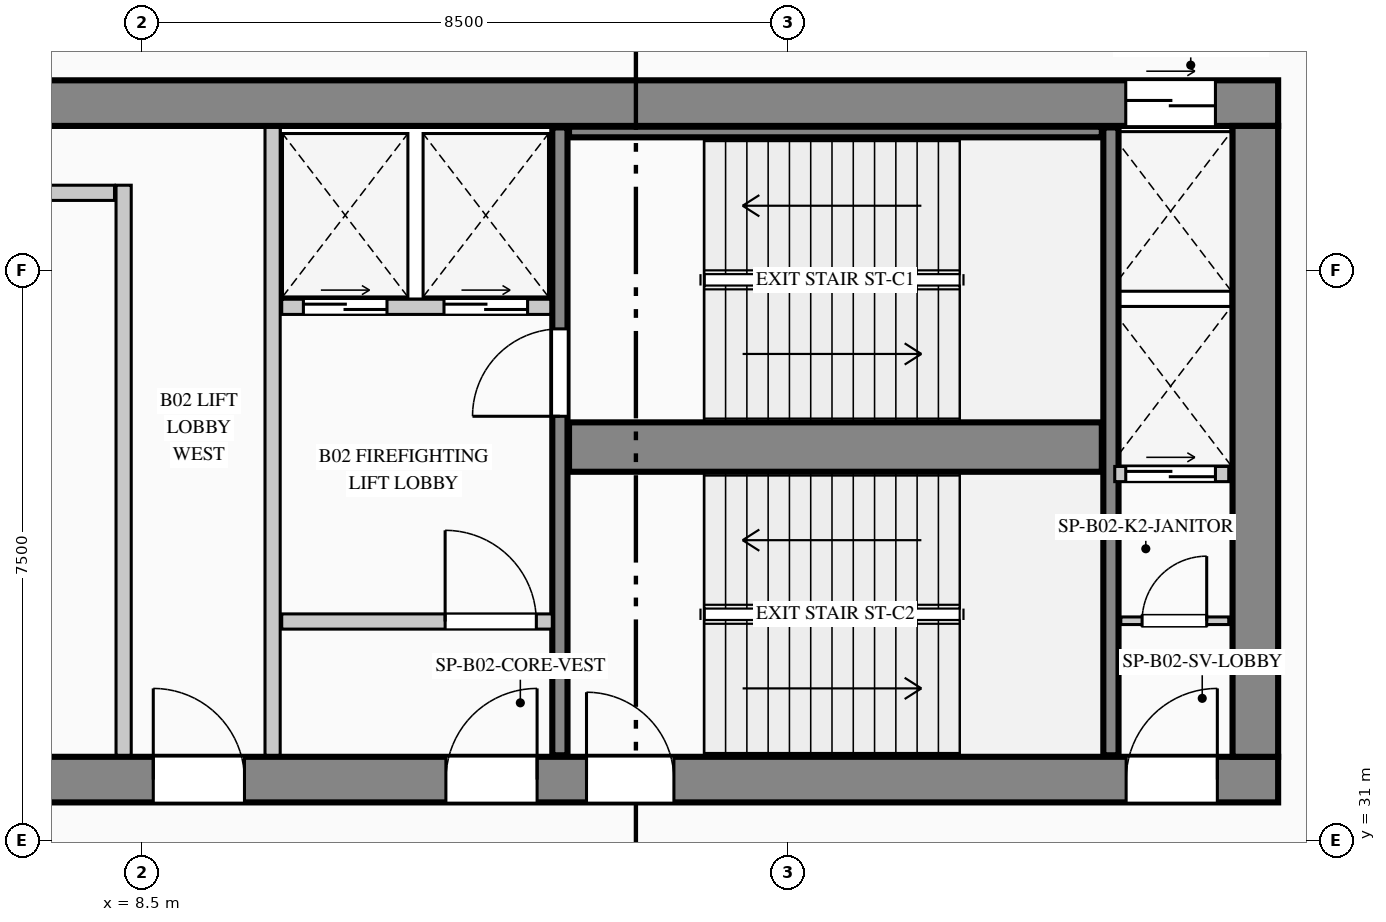
"""IFC4 building model, lengths in metres.
Left out: names, types, materials, properties, quantities, classifications, styles, units other than length and angle.
Written with IfcOpenShell. Run it as: python <this file> out.ifc"""

import sys

from ifc_helpers import new_model, si_unit, direction, frame, frame_2d, origin, place, context, subcontext, project, spatial, rectangle, extrude, element, fill, save


model = new_model("IFC4")
c1 = context("Model", 3, precision=1e-05, world=origin(), true_north=direction((0.0, 1.0)))
c2 = subcontext(c1, "Body", "Model", "MODEL_VIEW")
j1 = project(units=[si_unit("LENGTHUNIT", "METRE"), si_unit("PLANEANGLEUNIT", "RADIAN")], contexts=[c1])
p1 = place(None, origin())
s1 = spatial("IfcSite", under=j1, at=p1, CompositionType="ELEMENT")
p2 = place(p1, origin())
s2 = spatial("IfcBuilding", under=s1, at=p2, CompositionType="ELEMENT")
p3 = place(p2, frame((0.0, 0.0, -9.0)))
s3 = spatial("IfcBuildingStorey", under=s2, at=p3, CompositionType="ELEMENT", Elevation=-9.0)
p4 = place(p3, frame((5.4, 40.7, 0.0), z_axis=(0.0, 0.0, 1.0), x_axis=(1.0, 0.0, 0.0)))
e1 = element("IfcWall", 1, at=p4, inside=s3, PredefinedType="SHEAR", context=c2, shape_type="SweptSolid", body=[
    extrude(rectangle(XDim=18.05, YDim=0.6, at=frame_2d((9.025, 0.0))), origin(), (0.0, 0.0, 1.0), 4.5),
])
p5 = place(p4, frame((16.045, 0.0, 0.0)))
e2 = element("IfcOpeningElement", 2, at=p5, cuts=e1, PredefinedType="OPENING", context=c2, shape_type="SweptSolid", body=[
    extrude(rectangle(XDim=1.18, YDim=2.25, at=frame_2d((0.59, 1.125))), frame((0.0, 0.31, 0.0), z_axis=(0.0, -1.0, 0.0), x_axis=(1.0, 0.0, 0.0)), (0.0, 0.0, 1.0), 0.62),
])
p6 = place(p3, frame((5.4, 31.8, 0.0), z_axis=(0.0, 0.0, 1.0), x_axis=(1.0, 0.0, 0.0)))
e3 = element("IfcWall", 3, at=p6, inside=s3, PredefinedType="SHEAR", context=c2, shape_type="SweptSolid", body=[
    extrude(rectangle(XDim=18.05, YDim=0.6, at=frame_2d((9.025, 0.0))), origin(), (0.0, 0.0, 1.0), 4.5),
])
p7 = place(p6, frame((3.25, 0.0, 0.0)))
e4 = element("IfcOpeningElement", 4, at=p7, cuts=e3, PredefinedType="OPENING", context=c2, shape_type="SweptSolid", body=[
    extrude(rectangle(XDim=1.2, YDim=2.2, at=frame_2d((0.6, 1.1))), frame((0.0, 0.31, 0.0), z_axis=(0.0, -1.0, 0.0), x_axis=(1.0, 0.0, 0.0)), (0.0, 0.0, 1.0), 0.62),
])
p8 = place(p6, frame((7.1, 0.0, 0.0)))
e5 = element("IfcOpeningElement", 5, at=p8, cuts=e3, PredefinedType="OPENING", context=c2, shape_type="SweptSolid", body=[
    extrude(rectangle(XDim=1.2, YDim=2.2, at=frame_2d((0.6, 1.1))), frame((0.0, 0.31, 0.0), z_axis=(0.0, -1.0, 0.0), x_axis=(1.0, 0.0, 0.0)), (0.0, 0.0, 1.0), 0.62),
])
p9 = place(p6, frame((8.95, 0.0, 0.0)))
e6 = element("IfcOpeningElement", 6, at=p9, cuts=e3, PredefinedType="OPENING", context=c2, shape_type="SweptSolid", body=[
    extrude(rectangle(XDim=1.15, YDim=2.2, at=frame_2d((0.575, 1.1))), frame((0.0, 0.31, 0.0), z_axis=(0.0, -1.0, 0.0), x_axis=(1.0, 0.0, 0.0)), (0.0, 0.0, 1.0), 0.62),
])
p10 = place(p6, frame((16.05, 0.0, 0.0)))
e7 = element("IfcOpeningElement", 7, at=p10, cuts=e3, PredefinedType="OPENING", context=c2, shape_type="SweptSolid", body=[
    extrude(rectangle(XDim=1.2, YDim=2.2, at=frame_2d((0.6, 1.1))), frame((0.0, 0.31, 0.0), z_axis=(0.0, -1.0, 0.0), x_axis=(1.0, 0.0, 0.0)), (0.0, 0.0, 1.0), 0.62),
])
p11 = place(p3, frame((23.15, 32.1, 0.0), z_axis=(0.0, 0.0, 1.0), x_axis=(0.0, 1.0, 0.0)))
e8 = element("IfcWall", 8, at=p11, inside=s3, PredefinedType="SHEAR", context=c2, shape_type="SweptSolid", body=[
    extrude(rectangle(XDim=8.3, YDim=0.6, at=frame_2d((4.15, 0.0))), origin(), (0.0, 0.0, 1.0), 4.5),
])
p12 = place(p3, frame((14.0, 32.12, 0.0), z_axis=(0.0, 0.0, 1.0), x_axis=(0.0, 1.0, 0.0)))
e9 = element("IfcWall", 9, at=p12, inside=s3, PredefinedType="SHEAR", context=c2, shape_type="SweptSolid", body=[
    extrude(rectangle(XDim=8.26, YDim=0.2, at=frame_2d((4.13, 0.0))), origin(), (0.0, 0.0, 1.0), 4.5),
])
p13 = place(p12, frame((4.46, 0.0, 0.0)))
e10 = element("IfcOpeningElement", 10, at=p13, cuts=e9, PredefinedType="OPENING", context=c2, shape_type="SweptSolid", body=[
    extrude(rectangle(XDim=1.15, YDim=2.2, at=frame_2d((0.575, 1.1))), frame((0.0, 0.11, 0.0), z_axis=(0.0, -1.0, 0.0), x_axis=(1.0, 0.0, 0.0)), (0.0, 0.0, 1.0), 0.22),
])
p14 = place(p3, frame((14.12, 36.175, 0.0), z_axis=(0.0, 0.0, 1.0), x_axis=(1.0, 0.0, 0.0)))
e11 = element("IfcWall", 11, at=p14, inside=s3, PredefinedType="SHEAR", context=c2, shape_type="SweptSolid", body=[
    extrude(rectangle(XDim=7.01, YDim=0.65, at=frame_2d((3.505, 0.0))), origin(), (0.0, 0.0, 1.0), 4.5),
])
p15 = place(p3, frame((21.25, 32.12, 0.0), z_axis=(0.0, 0.0, 1.0), x_axis=(0.0, 1.0, 0.0)))
e12 = element("IfcWall", 12, at=p15, inside=s3, PredefinedType="SHEAR", context=c2, shape_type="SweptSolid", body=[
    extrude(rectangle(XDim=8.26, YDim=0.2, at=frame_2d((4.13, 0.0))), origin(), (0.0, 0.0, 1.0), 4.5),
])
p16 = place(p3, frame((14.12, 40.32, 0.0), z_axis=(0.0, 0.0, 1.0), x_axis=(1.0, 0.0, 0.0)))
e13 = element("IfcWall", 13, at=p16, inside=s3, PredefinedType="SHEAR", context=c2, shape_type="SweptSolid", body=[
    extrude(rectangle(XDim=7.01, YDim=0.14, at=frame_2d((3.505, 0.0))), origin(), (0.0, 0.0, 1.0), 4.5),
])
p17 = place(p3, frame((8.26, 32.12, 0.0), z_axis=(0.0, 0.0, 1.0), x_axis=(0.0, 1.0, 0.0)))
e14 = element("IfcWall", 14, at=p17, inside=s3, PredefinedType="PARTITIONING", context=c2, shape_type="SweptSolid", body=[
    extrude(rectangle(XDim=7.5, YDim=0.2, at=frame_2d((3.75, 0.0))), origin(), (0.0, 0.0, 1.0), 4.15),
])
p18 = place(p3, frame((6.02, 39.52, 0.0), z_axis=(0.0, 0.0, 1.0), x_axis=(1.0, 0.0, 0.0)))
e15 = element("IfcWall", 15, at=p18, inside=s3, PredefinedType="PARTITIONING", context=c2, shape_type="SweptSolid", body=[
    extrude(rectangle(XDim=2.12, YDim=0.2, at=frame_2d((1.06, 0.0))), origin(), (0.0, 0.0, 1.0), 4.15),
])
p19 = place(p3, frame((10.22, 32.12, 0.0), z_axis=(0.0, 0.0, 1.0), x_axis=(0.0, 1.0, 0.0)))
e16 = element("IfcWall", 16, at=p19, inside=s3, PredefinedType="PARTITIONING", context=c2, shape_type="SweptSolid", body=[
    extrude(rectangle(XDim=8.26, YDim=0.2, at=frame_2d((4.13, 0.0))), origin(), (0.0, 0.0, 1.0), 4.15),
])
p20 = place(p3, frame((10.34, 38.02, 0.0), z_axis=(0.0, 0.0, 1.0), x_axis=(1.0, 0.0, 0.0)))
e17 = element("IfcWall", 17, at=p20, inside=s3, PredefinedType="PARTITIONING", context=c2, shape_type="SweptSolid", body=[
    extrude(rectangle(XDim=3.54, YDim=0.2, at=frame_2d((1.77, 0.0))), origin(), (0.0, 0.0, 1.0), 4.15),
])
p21 = place(p20, frame((0.285, 0.0, 0.0)))
e18 = element("IfcOpeningElement", 18, at=p21, cuts=e17, PredefinedType="OPENING", context=c2, shape_type="SweptSolid", body=[
    extrude(rectangle(XDim=1.1, YDim=2.2, at=frame_2d((0.55, 1.1))), frame((0.0, 0.11, 0.0), z_axis=(0.0, -1.0, 0.0), x_axis=(1.0, 0.0, 0.0)), (0.0, 0.0, 1.0), 0.22),
])
p22 = place(p20, frame((2.135, 0.0, 0.0)))
e19 = element("IfcOpeningElement", 19, at=p22, cuts=e17, PredefinedType="OPENING", context=c2, shape_type="SweptSolid", body=[
    extrude(rectangle(XDim=1.1, YDim=2.2, at=frame_2d((0.55, 1.1))), frame((0.0, 0.11, 0.0), z_axis=(0.0, -1.0, 0.0), x_axis=(1.0, 0.0, 0.0)), (0.0, 0.0, 1.0), 0.22),
])
p23 = place(p3, frame((10.34, 33.88, 0.0), z_axis=(0.0, 0.0, 1.0), x_axis=(1.0, 0.0, 0.0)))
e20 = element("IfcWall", 20, at=p23, inside=s3, PredefinedType="PARTITIONING", context=c2, shape_type="SweptSolid", body=[
    extrude(rectangle(XDim=3.56, YDim=0.2, at=frame_2d((1.78, 0.0))), origin(), (0.0, 0.0, 1.0), 4.15),
])
p24 = place(p23, frame((2.15, 0.0, 0.0)))
e21 = element("IfcOpeningElement", 21, at=p24, cuts=e20, PredefinedType="OPENING", context=c2, shape_type="SweptSolid", body=[
    extrude(rectangle(XDim=1.2, YDim=2.2, at=frame_2d((0.6, 1.1))), frame((0.0, 0.11, 0.0), z_axis=(0.0, -1.0, 0.0), x_axis=(1.0, 0.0, 0.0)), (0.0, 0.0, 1.0), 0.22),
])
p25 = place(p3, frame((21.38, 33.89, 0.0), z_axis=(0.0, 0.0, 1.0), x_axis=(1.0, 0.0, 0.0)))
e22 = element("IfcWall", 22, at=p25, inside=s3, PredefinedType="PARTITIONING", context=c2, shape_type="SweptSolid", body=[
    extrude(rectangle(XDim=1.42, YDim=0.1, at=frame_2d((0.71, 0.0))), origin(), (0.0, 0.0, 1.0), 4.15),
])
p26 = place(p25, frame((0.28, 0.0, 0.0)))
e23 = element("IfcOpeningElement", 23, at=p26, cuts=e22, PredefinedType="OPENING", context=c2, shape_type="SweptSolid", body=[
    extrude(rectangle(XDim=0.85, YDim=2.1, at=frame_2d((0.425, 1.05))), frame((0.0, 0.06, 0.0), z_axis=(0.0, -1.0, 0.0), x_axis=(1.0, 0.0, 0.0)), (0.0, 0.0, 1.0), 0.12),
])
p27 = place(p3, frame((21.3, 35.82, 0.0), z_axis=(0.0, 0.0, 1.0), x_axis=(1.0, 0.0, 0.0)))
e24 = element("IfcWall", 24, at=p27, inside=s3, PredefinedType="PARTITIONING", context=c2, shape_type="SweptSolid", body=[
    extrude(rectangle(XDim=1.5, YDim=0.2, at=frame_2d((0.75, 0.0))), origin(), (0.0, 0.0, 1.0), 4.15),
])
p28 = place(p27, frame((0.145, 0.0, 0.0)))
e25 = element("IfcOpeningElement", 25, at=p28, cuts=e24, PredefinedType="OPENING", context=c2, shape_type="SweptSolid", body=[
    extrude(rectangle(XDim=1.18, YDim=2.25, at=frame_2d((0.59, 1.125))), frame((0.0, 0.11, 0.0), z_axis=(0.0, -1.0, 0.0), x_axis=(1.0, 0.0, 0.0)), (0.0, 0.0, 1.0), 0.22),
])
p29 = place(p7, origin())
e26 = element("IfcDoor", 26, at=p29, inside=s3, OperationType="SINGLE_SWING_LEFT", PredefinedType="DOOR", context=c2, shape_type="SweptSolid", body=[
    extrude(rectangle(XDim=1.2, YDim=2.2, at=frame_2d((0.6, 1.1))), frame((0.0, 0.025, 0.0), z_axis=(0.0, -1.0, 0.0), x_axis=(1.0, 0.0, 0.0)), (0.0, 0.0, 1.0), 0.05),
])
fill(e4, e26)
p30 = place(p8, origin())
e27 = element("IfcDoor", 27, at=p30, inside=s3, OperationType="SINGLE_SWING_RIGHT", PredefinedType="DOOR", context=c2, shape_type="SweptSolid", body=[
    extrude(rectangle(XDim=1.2, YDim=2.2, at=frame_2d((0.6, 1.1))), frame((0.0, 0.025, 0.0), z_axis=(0.0, -1.0, 0.0), x_axis=(1.0, 0.0, 0.0)), (0.0, 0.0, 1.0), 0.05),
])
fill(e5, e27)
p31 = place(p9, origin())
e28 = element("IfcDoor", 28, at=p31, inside=s3, OperationType="SINGLE_SWING_LEFT", PredefinedType="DOOR", context=c2, shape_type="SweptSolid", body=[
    extrude(rectangle(XDim=1.15, YDim=2.2, at=frame_2d((0.575, 1.1))), frame((0.0, 0.025, 0.0), z_axis=(0.0, -1.0, 0.0), x_axis=(1.0, 0.0, 0.0)), (0.0, 0.0, 1.0), 0.05),
])
fill(e6, e28)
p32 = place(p10, origin())
e29 = element("IfcDoor", 29, at=p32, inside=s3, OperationType="SINGLE_SWING_RIGHT", PredefinedType="DOOR", context=c2, shape_type="SweptSolid", body=[
    extrude(rectangle(XDim=1.2, YDim=2.2, at=frame_2d((0.6, 1.1))), frame((0.0, 0.025, 0.0), z_axis=(0.0, -1.0, 0.0), x_axis=(1.0, 0.0, 0.0)), (0.0, 0.0, 1.0), 0.05),
])
fill(e7, e29)
p33 = place(p24, origin())
e30 = element("IfcDoor", 30, at=p33, inside=s3, OperationType="SINGLE_SWING_LEFT", PredefinedType="DOOR", context=c2, shape_type="SweptSolid", body=[
    extrude(rectangle(XDim=1.2, YDim=2.2, at=frame_2d((0.6, 1.1))), frame((0.0, 0.025, 0.0), z_axis=(0.0, -1.0, 0.0), x_axis=(1.0, 0.0, 0.0)), (0.0, 0.0, 1.0), 0.05),
])
fill(e21, e30)
p34 = place(p26, origin())
e31 = element("IfcDoor", 31, at=p34, inside=s3, OperationType="SINGLE_SWING_RIGHT", PredefinedType="DOOR", context=c2, shape_type="SweptSolid", body=[
    extrude(rectangle(XDim=0.85, YDim=2.1, at=frame_2d((0.425, 1.05))), frame((0.0, 0.025, 0.0), z_axis=(0.0, -1.0, 0.0), x_axis=(1.0, 0.0, 0.0)), (0.0, 0.0, 1.0), 0.05),
])
fill(e23, e31)
p35 = place(p13, origin())
e32 = element("IfcDoor", 32, at=p35, inside=s3, OperationType="SINGLE_SWING_LEFT", PredefinedType="DOOR", context=c2, shape_type="SweptSolid", body=[
    extrude(rectangle(XDim=1.15, YDim=2.2, at=frame_2d((0.575, 1.1))), frame((0.0, 0.025, 0.0), z_axis=(0.0, -1.0, 0.0), x_axis=(1.0, 0.0, 0.0)), (0.0, 0.0, 1.0), 0.05),
])
fill(e10, e32)
p36 = place(p21, origin())
e33 = element("IfcDoor", 33, at=p36, inside=s3, OperationType="DOUBLE_DOOR_SLIDING", PredefinedType="DOOR", context=c2, shape_type="SweptSolid", body=[
    extrude(rectangle(XDim=1.1, YDim=2.2, at=frame_2d((0.55, 1.1))), frame((0.0, 0.025, 0.0), z_axis=(0.0, -1.0, 0.0), x_axis=(1.0, 0.0, 0.0)), (0.0, 0.0, 1.0), 0.05),
])
fill(e18, e33)
p37 = place(p22, origin())
e34 = element("IfcDoor", 34, at=p37, inside=s3, OperationType="DOUBLE_DOOR_SLIDING", PredefinedType="DOOR", context=c2, shape_type="SweptSolid", body=[
    extrude(rectangle(XDim=1.1, YDim=2.2, at=frame_2d((0.55, 1.1))), frame((0.0, 0.025, 0.0), z_axis=(0.0, -1.0, 0.0), x_axis=(1.0, 0.0, 0.0)), (0.0, 0.0, 1.0), 0.05),
])
fill(e19, e34)
p38 = place(p5, origin())
e35 = element("IfcDoor", 35, at=p38, inside=s3, OperationType="DOUBLE_DOOR_SLIDING", PredefinedType="DOOR", context=c2, shape_type="SweptSolid", body=[
    extrude(rectangle(XDim=1.18, YDim=2.25, at=frame_2d((0.59, 1.125))), frame((0.0, 0.025, 0.0), z_axis=(0.0, -1.0, 0.0), x_axis=(1.0, 0.0, 0.0)), (0.0, 0.0, 1.0), 0.05),
])
fill(e2, e35)
p39 = place(p28, origin())
e36 = element("IfcDoor", 36, at=p39, inside=s3, OperationType="DOUBLE_DOOR_SLIDING", PredefinedType="DOOR", context=c2, shape_type="SweptSolid", body=[
    extrude(rectangle(XDim=1.18, YDim=2.25, at=frame_2d((0.59, 1.125))), frame((0.0, 0.025, 0.0), z_axis=(0.0, -1.0, 0.0), x_axis=(1.0, 0.0, 0.0)), (0.0, 0.0, 1.0), 0.05),
])
fill(e25, e36)
save(model, sys.argv[1])
